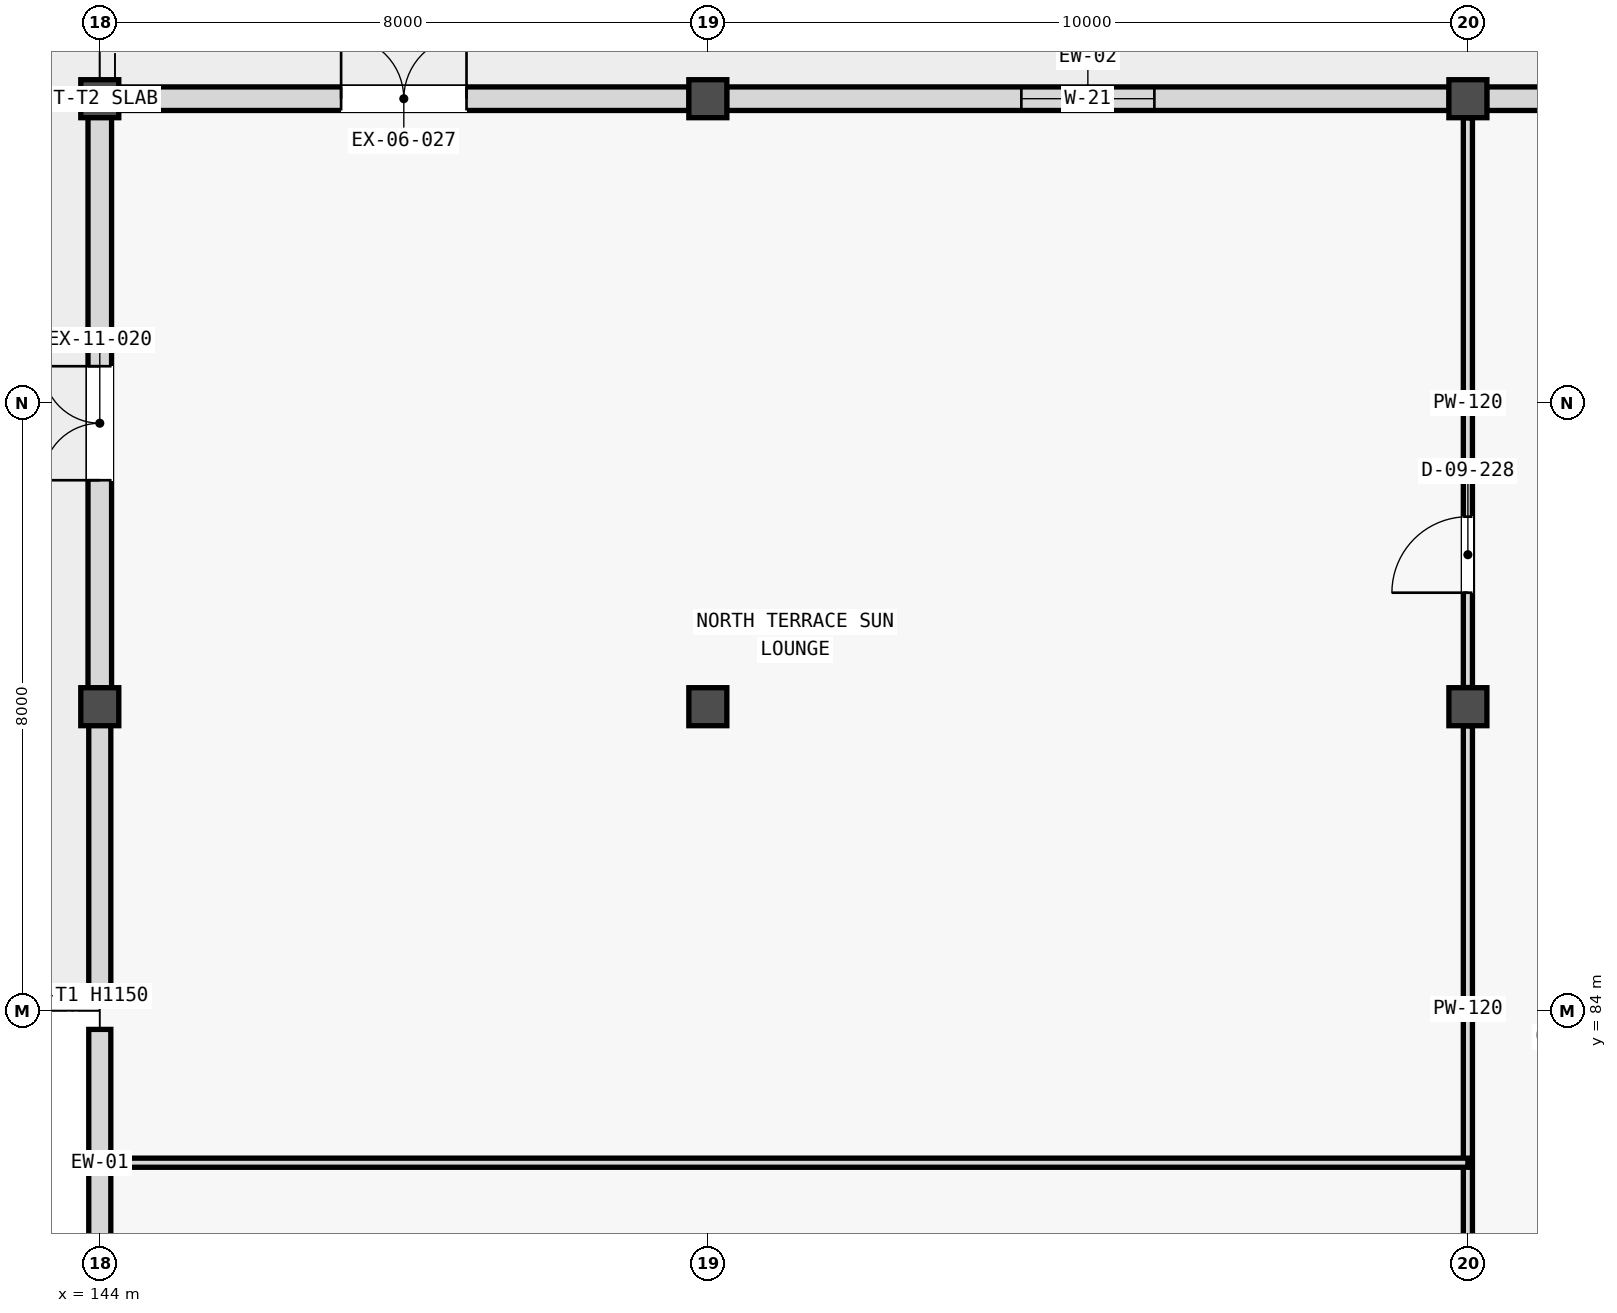
"""IFC4 building model, lengths in metres.
Left out: names, types, materials, properties, quantities, classifications, styles, units other than length and angle.
Written with IfcOpenShell. Run it as: python <this file> out.ifc"""

import sys

from ifc_helpers import new_model, si_unit, direction, frame, frame_2d, origin, origin_2d, place, context, subcontext, project, spatial, rectangle, extrude, element, fill, save


model = new_model("IFC4")
c1 = context("Model", 3, precision=1e-05, world=origin(), true_north=direction((0.0, 1.0)))
c2 = subcontext(c1, "Body", "Model", "MODEL_VIEW")
j1 = project(units=[si_unit("LENGTHUNIT", "METRE"), si_unit("PLANEANGLEUNIT", "RADIAN")], contexts=[c1])
p1 = place(None, origin())
s1 = spatial("IfcSite", under=j1, at=p1, CompositionType="ELEMENT")
p2 = place(p1, origin())
s2 = spatial("IfcBuilding", under=s1, at=p2, CompositionType="ELEMENT")
p3 = place(p2, frame((0.0, 0.0, 10.2)))
s3 = spatial("IfcBuildingStorey", under=s2, at=p3, CompositionType="ELEMENT", Elevation=10.2)
for number, where, z_axis, x_axis in (
    (1, (144.0, 88.0, 0.0), (0.0, 0.0, 1.0), (1.0, 0.0, 0.0)),
    (2, (152.0, 88.0, 0.0), (0.0, 0.0, 1.0), (1.0, 0.0, 0.0)),
    (3, (162.0, 88.0, 0.0), (0.0, 0.0, 1.0), (1.0, 0.0, 0.0)),
):
    element("IfcColumn", number, at=place(p3, frame(where, z_axis=z_axis, x_axis=x_axis)), inside=s3, PredefinedType="COLUMN", context=c2, shape_type="SweptSolid", body=[
        extrude(rectangle(XDim=0.5, YDim=0.5, at=origin_2d()), origin(), (0.0, 0.0, 1.0), 3.96),
    ])
for number, where, z_axis, x_axis in (
    (4, (144.0, 96.0, 0.0), (0.0, 0.0, 1.0), (1.0, 0.0, 0.0)),
    (5, (152.0, 96.0, 0.0), (0.0, 0.0, 1.0), (1.0, 0.0, 0.0)),
    (6, (162.0, 96.0, 0.0), (0.0, 0.0, 1.0), (1.0, 0.0, 0.0)),
):
    element("IfcColumn", number, at=place(p3, frame(where, z_axis=z_axis, x_axis=x_axis)), inside=s3, PredefinedType="COLUMN", context=c2, shape_type="SweptSolid", body=[
        extrude(rectangle(XDim=0.5, YDim=0.5, at=origin_2d()), origin(), (0.0, 0.0, 1.0), 3.99),
    ])
for number, where, z_axis, x_axis in (
    (7, (144.0, 80.246, 0.0), (0.0, 0.0, 1.0), (0.0, 1.0, 0.0)),
    (8, (144.0, 84.246, 0.0), (0.0, 0.0, 1.0), (0.0, 1.0, 0.0)),
):
    element("IfcWall", number, at=place(p3, frame(where, z_axis=z_axis, x_axis=x_axis)), inside=s3, PredefinedType="STANDARD", context=c2, shape_type="SweptSolid", body=[
        extrude(rectangle(XDim=3.508, YDim=0.29, at=frame_2d((1.754, 0.0))), origin(), (0.0, 0.0, 1.0), 3.3),
    ])
p4 = place(p3, frame((144.0, 88.246, 0.0), z_axis=(0.0, 0.0, 1.0), x_axis=(0.0, 1.0, 0.0)))
e9 = element("IfcWall", 9, at=p4, inside=s3, PredefinedType="STANDARD", context=c2, shape_type="SweptSolid", body=[
    extrude(rectangle(XDim=7.508, YDim=0.31, at=frame_2d((3.754, 0.0))), origin(), (0.0, 0.0, 1.0), 3.3),
])
p5 = place(p4, frame((2.734, 0.0, 0.0)))
e10 = element("IfcOpeningElement", 10, at=p5, cuts=e9, PredefinedType="OPENING", context=c2, shape_type="SweptSolid", body=[
    extrude(rectangle(XDim=1.5, YDim=2.25, at=frame_2d((0.75, 1.125))), frame((0.0, 0.165, 0.0), z_axis=(0.0, -1.0, 0.0), x_axis=(1.0, 0.0, 0.0)), (0.0, 0.0, 1.0), 0.33),
])
p6 = place(p3, frame((144.246, 96.0, 0.0), z_axis=(0.0, 0.0, 1.0), x_axis=(1.0, 0.0, 0.0)))
e11 = element("IfcWall", 11, at=p6, inside=s3, PredefinedType="STANDARD", context=c2, shape_type="SweptSolid", body=[
    extrude(rectangle(XDim=7.508, YDim=0.31, at=frame_2d((3.754, 0.0))), origin(), (0.0, 0.0, 1.0), 3.15),
])
p7 = place(p6, frame((2.929, 0.0, 0.0)))
e12 = element("IfcOpeningElement", 12, at=p7, cuts=e11, PredefinedType="OPENING", context=c2, shape_type="SweptSolid", body=[
    extrude(rectangle(XDim=1.65, YDim=2.2, at=frame_2d((0.825, 1.1))), frame((0.0, 0.165, 0.0), z_axis=(0.0, -1.0, 0.0), x_axis=(1.0, 0.0, 0.0)), (0.0, 0.0, 1.0), 0.33),
])
p8 = place(p3, frame((152.246, 96.0, 0.0), z_axis=(0.0, 0.0, 1.0), x_axis=(1.0, 0.0, 0.0)))
e13 = element("IfcWall", 13, at=p8, inside=s3, PredefinedType="STANDARD", context=c2, shape_type="SweptSolid", body=[
    extrude(rectangle(XDim=9.508, YDim=0.31, at=frame_2d((4.754, 0.0))), origin(), (0.0, 0.0, 1.0), 3.15),
])
p9 = place(p8, frame((3.879, 0.0, 0.95)))
e14 = element("IfcOpeningElement", 14, at=p9, cuts=e13, PredefinedType="OPENING", context=c2, shape_type="SweptSolid", body=[
    extrude(rectangle(XDim=1.75, YDim=1.55, at=frame_2d((0.875, 0.775))), frame((0.0, 0.165, 0.0), z_axis=(0.0, -1.0, 0.0), x_axis=(1.0, 0.0, 0.0)), (0.0, 0.0, 1.0), 0.33),
])
p10 = place(p3, frame((162.246, 96.0, 0.0), z_axis=(0.0, 0.0, 1.0), x_axis=(1.0, 0.0, 0.0)))
e15 = element("IfcWall", 15, at=p10, inside=s3, PredefinedType="STANDARD", context=c2, shape_type="SweptSolid", body=[
    extrude(rectangle(XDim=11.508, YDim=0.31, at=frame_2d((5.754, 0.0))), origin(), (0.0, 0.0, 1.0), 3.15),
])
p11 = place(p10, frame((4.804, 0.0, 0.95)))
e16 = element("IfcOpeningElement", 16, at=p11, cuts=e15, PredefinedType="OPENING", context=c2, shape_type="SweptSolid", body=[
    extrude(rectangle(XDim=1.9, YDim=1.45, at=frame_2d((0.95, 0.725))), frame((0.0, 0.165, 0.0), z_axis=(0.0, -1.0, 0.0), x_axis=(1.0, 0.0, 0.0)), (0.0, 0.0, 1.0), 0.33),
])
p12 = place(p3, frame((162.0, 80.302, 0.0), z_axis=(0.0, 0.0, 1.0), x_axis=(0.0, 1.0, 0.0)))
e17 = element("IfcWall", 17, at=p12, inside=s3, PredefinedType="PARTITIONING", context=c2, shape_type="SweptSolid", body=[
    extrude(rectangle(XDim=7.446, YDim=0.12, at=frame_2d((3.723, 0.0))), origin(), (0.0, 0.0, 1.0), 3.24),
])
p13 = place(p3, frame((162.0, 88.252, 0.0), z_axis=(0.0, 0.0, 1.0), x_axis=(0.0, 1.0, 0.0)))
e18 = element("IfcWall", 18, at=p13, inside=s3, PredefinedType="PARTITIONING", context=c2, shape_type="SweptSolid", body=[
    extrude(rectangle(XDim=7.496, YDim=0.12, at=frame_2d((3.748, 0.0))), origin(), (0.0, 0.0, 1.0), 3.24),
])
p14 = place(p13, frame((1.248, 0.0, 0.0)))
e19 = element("IfcOpeningElement", 19, at=p14, cuts=e18, PredefinedType="OPENING", context=c2, shape_type="SweptSolid", body=[
    extrude(rectangle(XDim=1.0, YDim=2.15, at=frame_2d((0.5, 1.075))), frame((0.0, 0.07, 0.0), z_axis=(0.0, -1.0, 0.0), x_axis=(1.0, 0.0, 0.0)), (0.0, 0.0, 1.0), 0.14),
])
p15 = place(p3, frame((144.15, 82.0, 0.0), z_axis=(0.0, 0.0, 1.0), x_axis=(1.0, 0.0, 0.0)))
e20 = element("IfcWall", 20, at=p15, inside=s3, PredefinedType="PARTITIONING", context=c2, shape_type="SweptSolid", body=[
    extrude(rectangle(XDim=17.85, YDim=0.12, at=frame_2d((8.925, 0.0))), origin(), (0.0, 0.0, 1.0), 3.24),
])
p16 = place(p5, origin())
e21 = element("IfcDoor", 21, at=p16, inside=s3, OperationType="DOUBLE_DOOR_SINGLE_SWING", PredefinedType="DOOR", context=c2, shape_type="SweptSolid", body=[
    extrude(rectangle(XDim=1.5, YDim=2.25, at=frame_2d((0.75, 1.125))), frame((0.0, 0.025, 0.0), z_axis=(0.0, -1.0, 0.0), x_axis=(1.0, 0.0, 0.0)), (0.0, 0.0, 1.0), 0.05),
])
fill(e10, e21)
p17 = place(p7, origin())
e22 = element("IfcDoor", 22, at=p17, inside=s3, OperationType="DOUBLE_DOOR_SINGLE_SWING", PredefinedType="DOOR", context=c2, shape_type="SweptSolid", body=[
    extrude(rectangle(XDim=1.65, YDim=2.2, at=frame_2d((0.825, 1.1))), frame((0.0, 0.025, 0.0), z_axis=(0.0, -1.0, 0.0), x_axis=(1.0, 0.0, 0.0)), (0.0, 0.0, 1.0), 0.05),
])
fill(e12, e22)
p18 = place(p9, origin())
e23 = element("IfcWindow", 23, at=p18, inside=s3, PartitioningType="SINGLE_PANEL", PredefinedType="WINDOW", context=c2, shape_type="SweptSolid", body=[
    extrude(rectangle(XDim=1.75, YDim=1.55, at=frame_2d((0.875, 0.775))), frame((0.0, 0.03, 0.0), z_axis=(0.0, -1.0, 0.0), x_axis=(1.0, 0.0, 0.0)), (0.0, 0.0, 1.0), 0.06),
])
fill(e14, e23)
p19 = place(p14, origin())
e24 = element("IfcDoor", 24, at=p19, inside=s3, OperationType="SINGLE_SWING_LEFT", PredefinedType="DOOR", context=c2, shape_type="SweptSolid", body=[
    extrude(rectangle(XDim=1.0, YDim=2.15, at=frame_2d((0.5, 1.075))), frame((0.0, 0.025, 0.0), z_axis=(0.0, -1.0, 0.0), x_axis=(1.0, 0.0, 0.0)), (0.0, 0.0, 1.0), 0.05),
])
fill(e19, e24)
save(model, sys.argv[1])
